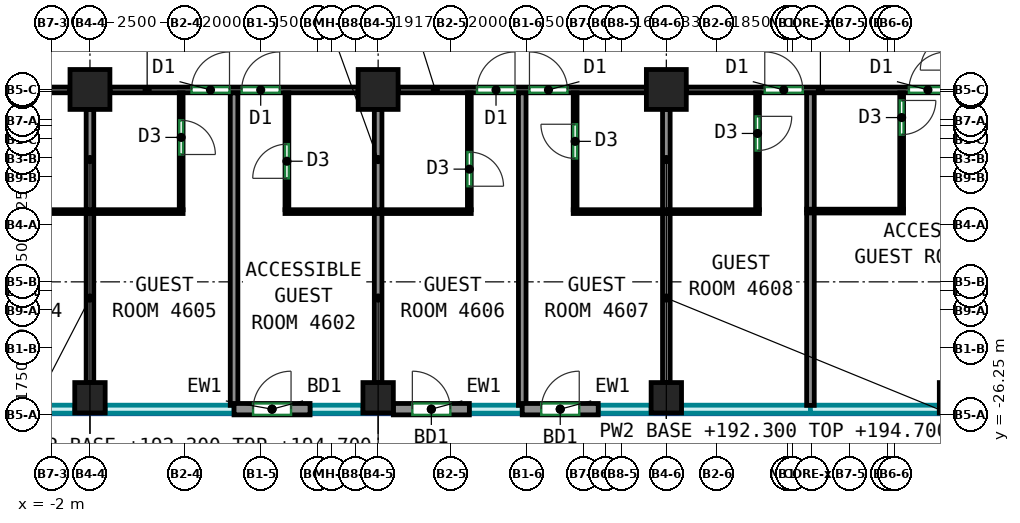
"""IFC4 building model, lengths in metres.
Left out: names, types, materials, properties, quantities, classifications, styles, units other than length and angle.
Written with IfcOpenShell. Run it as: python <this file> out.ifc"""

import sys

from ifc_helpers import new_model, si_unit, direction, frame, frame_2d, origin, origin_2d, place, context, subcontext, project, spatial, rectangle, extrude, source, transform, mapped, element, fill, save


model = new_model("IFC4")
c1 = context("Model", 3, precision=1e-05, world=origin(), true_north=direction((0.0, 1.0)))
c2 = subcontext(c1, "Body", "Model", "MODEL_VIEW")
j1 = project(units=[si_unit("LENGTHUNIT", "METRE"), si_unit("PLANEANGLEUNIT", "RADIAN")], contexts=[c1])
p1 = place(None, origin())
s1 = spatial("IfcSite", under=j1, at=p1, CompositionType="ELEMENT")
p2 = place(p1, origin())
s2 = spatial("IfcBuilding", under=s1, at=p2, CompositionType="ELEMENT")
p3 = place(p2, frame((0.0, 0.0, 192.3)))
s3 = spatial("IfcBuildingStorey", under=s2, at=p3, CompositionType="ELEMENT", Elevation=192.3)
m1 = source(origin(), c2, "Body", "SweptSolid", [
    extrude(rectangle(XDim=0.8, YDim=0.8, at=origin_2d()), origin(), (0.0, 0.0, 1.0), 3.0),
])
p4 = place(p3, frame((-1.0, -25.8, 0.0), z_axis=(0.0, 0.0, 1.0), x_axis=(1.0, 0.0, 0.0)))
e1 = element("IfcColumn", 1, at=p4, inside=s3, PredefinedType="COLUMN", context=c2, shape_type="MappedRepresentation", body=[
    mapped(m1, transform((0.0, 0.0, 0.0))),
])
m2 = source(origin(), c2, "Body", "SweptSolid", [
    extrude(rectangle(XDim=1.05, YDim=1.05, at=origin_2d()), origin(), (0.0, 0.0, 1.0), 3.0),
])
p5 = place(p3, frame((-1.0, -17.688, 0.0), z_axis=(0.0, 0.0, 1.0), x_axis=(1.0, 0.0, 0.0)))
e2 = element("IfcColumn", 2, at=p5, inside=s3, PredefinedType="COLUMN", context=c2, shape_type="MappedRepresentation", body=[
    mapped(m2, transform((0.0, 0.0, 0.0))),
])
p6 = place(p3, frame((6.583, -25.8, 0.0), z_axis=(0.0, 0.0, 1.0), x_axis=(1.0, 0.0, 0.0)))
e3 = element("IfcColumn", 3, at=p6, inside=s3, PredefinedType="COLUMN", context=c2, shape_type="MappedRepresentation", body=[
    mapped(m1, transform((0.0, 0.0, 0.0))),
])
p7 = place(p3, frame((6.583, -17.688, 0.0), z_axis=(0.0, 0.0, 1.0), x_axis=(1.0, 0.0, 0.0)))
e4 = element("IfcColumn", 4, at=p7, inside=s3, PredefinedType="COLUMN", context=c2, shape_type="MappedRepresentation", body=[
    mapped(m2, transform((0.0, 0.0, 0.0))),
])
p8 = place(p3, frame((14.167, -25.8, 0.0), z_axis=(0.0, 0.0, 1.0), x_axis=(1.0, 0.0, 0.0)))
e5 = element("IfcColumn", 5, at=p8, inside=s3, PredefinedType="COLUMN", context=c2, shape_type="MappedRepresentation", body=[
    mapped(m1, transform((0.0, 0.0, 0.0))),
])
p9 = place(p3, frame((14.167, -17.688, 0.0), z_axis=(0.0, 0.0, 1.0), x_axis=(1.0, 0.0, 0.0)))
e6 = element("IfcColumn", 6, at=p9, inside=s3, PredefinedType="COLUMN", context=c2, shape_type="MappedRepresentation", body=[
    mapped(m2, transform((0.0, 0.0, 0.0))),
])
p10 = place(p3, frame((21.75, -25.8, 0.0), z_axis=(0.0, 0.0, 1.0), x_axis=(1.0, 0.0, 0.0)))
e7 = element("IfcColumn", 7, at=p10, inside=s3, PredefinedType="COLUMN", context=c2, shape_type="MappedRepresentation", body=[
    mapped(m1, transform((0.0, 0.0, 0.0))),
])
m3 = source(origin(), c2, "Body", "SweptSolid", [
    extrude(rectangle(XDim=2.0, YDim=0.3, at=frame_2d((1.0, 0.0))), origin(), (0.0, 0.0, 1.0), 3.0),
])
p11 = place(p3, frame((2.792, -26.1, 0.0), z_axis=(0.0, 0.0, 1.0), x_axis=(1.0, 0.0, 0.0)))
e8 = element("IfcWall", 8, at=p11, inside=s3, PredefinedType="SOLIDWALL", context=c2, shape_type="MappedRepresentation", body=[
    mapped(m3, transform((0.0, 0.0, 0.0))),
])
p12 = place(p11, frame((0.5, 0.0, 0.0)))
e9 = element("IfcOpeningElement", 9, at=p12, cuts=e8, PredefinedType="OPENING", context=c2, shape_type="SweptSolid", body=[
    extrude(rectangle(XDim=1.0, YDim=2.1, at=frame_2d((0.5, 1.05))), frame((0.0, 0.16, 0.0), z_axis=(0.0, -1.0, 0.0), x_axis=(1.0, 0.0, 0.0)), (0.0, 0.0, 1.0), 0.32),
])
p13 = place(p3, frame((6.983, -26.1, 0.0), z_axis=(0.0, 0.0, 1.0), x_axis=(1.0, 0.0, 0.0)))
e10 = element("IfcWall", 10, at=p13, inside=s3, PredefinedType="SOLIDWALL", context=c2, shape_type="MappedRepresentation", body=[
    mapped(m3, transform((0.0, 0.0, 0.0))),
])
p14 = place(p13, frame((0.5, 0.0, 0.0)))
e11 = element("IfcOpeningElement", 11, at=p14, cuts=e10, PredefinedType="OPENING", context=c2, shape_type="SweptSolid", body=[
    extrude(rectangle(XDim=1.0, YDim=2.1, at=frame_2d((0.5, 1.05))), frame((0.0, 0.16, 0.0), z_axis=(0.0, -1.0, 0.0), x_axis=(1.0, 0.0, 0.0)), (0.0, 0.0, 1.0), 0.32),
])
p15 = place(p3, frame((10.375, -26.1, 0.0), z_axis=(0.0, 0.0, 1.0), x_axis=(1.0, 0.0, 0.0)))
e12 = element("IfcWall", 12, at=p15, inside=s3, PredefinedType="SOLIDWALL", context=c2, shape_type="MappedRepresentation", body=[
    mapped(m3, transform((0.0, 0.0, 0.0))),
])
p16 = place(p15, frame((0.5, 0.0, 0.0)))
e13 = element("IfcOpeningElement", 13, at=p16, cuts=e12, PredefinedType="OPENING", context=c2, shape_type="SweptSolid", body=[
    extrude(rectangle(XDim=1.0, YDim=2.1, at=frame_2d((0.5, 1.05))), frame((0.0, 0.16, 0.0), z_axis=(0.0, -1.0, 0.0), x_axis=(1.0, 0.0, 0.0)), (0.0, 0.0, 1.0), 0.32),
])
p17 = place(p3, frame((-8.058, -17.7, 0.0), z_axis=(0.0, 0.0, 1.0), x_axis=(1.0, 0.0, 0.0)))
e14 = element("IfcWall", 14, at=p17, inside=s3, PredefinedType="PARTITIONING", context=c2, shape_type="SweptSolid", body=[
    extrude(rectangle(XDim=6.533, YDim=0.15, at=frame_2d((3.267, 0.0))), origin(), (0.0, 0.0, 1.0), 2.4),
])
p18 = place(p17, frame((3.518, 0.0, 0.0)))
e15 = element("IfcOpeningElement", 15, at=p18, cuts=e14, PredefinedType="OPENING", context=c2, shape_type="SweptSolid", body=[
    extrude(rectangle(XDim=1.0, YDim=2.1, at=frame_2d((0.5, 1.05))), frame((0.0, 0.085, 0.0), z_axis=(0.0, -1.0, 0.0), x_axis=(1.0, 0.0, 0.0)), (0.0, 0.0, 1.0), 0.17),
])
p19 = place(p3, frame((-0.475, -17.7, 0.0), z_axis=(0.0, 0.0, 1.0), x_axis=(1.0, 0.0, 0.0)))
e16 = element("IfcWall", 16, at=p19, inside=s3, PredefinedType="PARTITIONING", context=c2, shape_type="SweptSolid", body=[
    extrude(rectangle(XDim=6.533, YDim=0.15, at=frame_2d((3.267, 0.0))), origin(), (0.0, 0.0, 1.0), 2.4),
])
p20 = place(p19, frame((2.147, 0.0, 0.0)))
e17 = element("IfcOpeningElement", 17, at=p20, cuts=e16, PredefinedType="OPENING", context=c2, shape_type="SweptSolid", body=[
    extrude(rectangle(XDim=1.0, YDim=2.1, at=frame_2d((0.5, 1.05))), frame((0.0, 0.085, 0.0), z_axis=(0.0, -1.0, 0.0), x_axis=(1.0, 0.0, 0.0)), (0.0, 0.0, 1.0), 0.17),
])
p21 = place(p19, frame((3.468, 0.0, 0.0)))
e18 = element("IfcOpeningElement", 18, at=p21, cuts=e16, PredefinedType="OPENING", context=c2, shape_type="SweptSolid", body=[
    extrude(rectangle(XDim=1.0, YDim=2.1, at=frame_2d((0.5, 1.05))), frame((0.0, 0.085, 0.0), z_axis=(0.0, -1.0, 0.0), x_axis=(1.0, 0.0, 0.0)), (0.0, 0.0, 1.0), 0.17),
])
p22 = place(p3, frame((7.108, -17.7, 0.0), z_axis=(0.0, 0.0, 1.0), x_axis=(1.0, 0.0, 0.0)))
e19 = element("IfcWall", 19, at=p22, inside=s3, PredefinedType="PARTITIONING", context=c2, shape_type="SweptSolid", body=[
    extrude(rectangle(XDim=6.534, YDim=0.15, at=frame_2d((3.267, 0.0))), origin(), (0.0, 0.0, 1.0), 2.4),
])
p23 = place(p22, frame((2.077, 0.0, 0.0)))
e20 = element("IfcOpeningElement", 20, at=p23, cuts=e19, PredefinedType="OPENING", context=c2, shape_type="SweptSolid", body=[
    extrude(rectangle(XDim=1.0, YDim=2.1, at=frame_2d((0.5, 1.05))), frame((0.0, 0.085, 0.0), z_axis=(0.0, -1.0, 0.0), x_axis=(1.0, 0.0, 0.0)), (0.0, 0.0, 1.0), 0.17),
])
p24 = place(p22, frame((3.457, 0.0, 0.0)))
e21 = element("IfcOpeningElement", 21, at=p24, cuts=e19, PredefinedType="OPENING", context=c2, shape_type="SweptSolid", body=[
    extrude(rectangle(XDim=1.0, YDim=2.1, at=frame_2d((0.5, 1.05))), frame((0.0, 0.085, 0.0), z_axis=(0.0, -1.0, 0.0), x_axis=(1.0, 0.0, 0.0)), (0.0, 0.0, 1.0), 0.17),
])
p25 = place(p3, frame((14.692, -17.7, 0.0), z_axis=(0.0, 0.0, 1.0), x_axis=(1.0, 0.0, 0.0)))
e22 = element("IfcWall", 22, at=p25, inside=s3, PredefinedType="PARTITIONING", context=c2, shape_type="SweptSolid", body=[
    extrude(rectangle(XDim=7.058, YDim=0.15, at=frame_2d((3.529, 0.0))), origin(), (0.0, 0.0, 1.0), 2.4),
])
p26 = place(p25, frame((2.065, 0.0, 0.0)))
e23 = element("IfcOpeningElement", 23, at=p26, cuts=e22, PredefinedType="OPENING", context=c2, shape_type="SweptSolid", body=[
    extrude(rectangle(XDim=1.0, YDim=2.1, at=frame_2d((0.5, 1.05))), frame((0.0, 0.085, 0.0), z_axis=(0.0, -1.0, 0.0), x_axis=(1.0, 0.0, 0.0)), (0.0, 0.0, 1.0), 0.17),
])
p27 = place(p25, frame((5.858, 0.0, 0.0)))
e24 = element("IfcOpeningElement", 24, at=p27, cuts=e22, PredefinedType="OPENING", context=c2, shape_type="SweptSolid", body=[
    extrude(rectangle(XDim=1.0, YDim=2.1, at=frame_2d((0.5, 1.05))), frame((0.0, 0.085, 0.0), z_axis=(0.0, -1.0, 0.0), x_axis=(1.0, 0.0, 0.0)), (0.0, 0.0, 1.0), 0.17),
])
p28 = place(p3, frame((-3.45, -20.902, 0.0), z_axis=(0.0, 0.0, 1.0), x_axis=(1.0, 0.0, 0.0)))
e25 = element("IfcWall", 25, at=p28, inside=s3, PredefinedType="PARTITIONING", context=c2, shape_type="SweptSolid", body=[
    extrude(rectangle(XDim=4.9, YDim=0.1, at=frame_2d((2.45, 0.0))), origin(), (0.0, 0.0, 1.0), 3.0),
])
p29 = place(p3, frame((-1.0, -25.4, 0.0), z_axis=(0.0, 0.0, 1.0), x_axis=(0.0, 1.0, 0.0)))
e26 = element("IfcWall", 26, at=p29, inside=s3, PredefinedType="PARTITIONING", context=c2, shape_type="SweptSolid", body=[
    extrude(rectangle(XDim=4.448, YDim=0.2, at=frame_2d((2.224, 0.0))), origin(), (0.0, 0.0, 1.0), 2.4),
])
p30 = place(p3, frame((-1.0, -20.852, 0.0), z_axis=(0.0, 0.0, 1.0), x_axis=(0.0, 1.0, 0.0)))
e27 = element("IfcWall", 27, at=p30, inside=s3, PredefinedType="PARTITIONING", context=c2, shape_type="SweptSolid", body=[
    extrude(rectangle(XDim=2.64, YDim=0.2, at=frame_2d((1.32, 0.0))), origin(), (0.0, 0.0, 1.0), 2.4),
])
p31 = place(p3, frame((1.4, -17.777, 0.0), z_axis=(0.0, 0.0, 1.0), x_axis=(0.0, -1.0, 0.0)))
e28 = element("IfcWall", 28, at=p31, inside=s3, PredefinedType="PARTITIONING", context=c2, shape_type="SweptSolid", body=[
    extrude(rectangle(XDim=3.075, YDim=0.1, at=frame_2d((1.538, 0.0))), origin(), (0.0, 0.0, 1.0), 3.0),
])
p32 = place(p31, frame((0.722, 0.0, 0.0)))
e29 = element("IfcOpeningElement", 29, at=p32, cuts=e28, PredefinedType="OPENING", context=c2, shape_type="SweptSolid", body=[
    extrude(rectangle(XDim=0.9, YDim=2.1, at=frame_2d((0.45, 1.05))), frame((0.0, 0.06, 0.0), z_axis=(0.0, -1.0, 0.0), x_axis=(1.0, 0.0, 0.0)), (0.0, 0.0, 1.0), 0.12),
])
p33 = place(p3, frame((2.792, -26.0, 0.0), z_axis=(0.0, 0.0, 1.0), x_axis=(0.0, 1.0, 0.0)))
e30 = element("IfcWall", 30, at=p33, inside=s3, PredefinedType="PARTITIONING", context=c2, shape_type="SweptSolid", body=[
    extrude(rectangle(XDim=8.223, YDim=0.2, at=frame_2d((4.111, 0.0))), origin(), (0.0, 0.0, 1.0), 3.0),
])
p34 = place(p3, frame((4.183, -20.852, 0.0), z_axis=(0.0, 0.0, 1.0), x_axis=(0.0, 1.0, 0.0)))
e31 = element("IfcWall", 31, at=p34, inside=s3, PredefinedType="PARTITIONING", context=c2, shape_type="SweptSolid", body=[
    extrude(rectangle(XDim=3.075, YDim=0.1, at=frame_2d((1.538, 0.0))), origin(), (0.0, 0.0, 1.0), 3.0),
])
p35 = place(p34, frame((0.826, 0.0, 0.0)))
e32 = element("IfcOpeningElement", 32, at=p35, cuts=e31, PredefinedType="OPENING", context=c2, shape_type="SweptSolid", body=[
    extrude(rectangle(XDim=0.9, YDim=2.1, at=frame_2d((0.45, 1.05))), frame((0.0, 0.06, 0.0), z_axis=(0.0, -1.0, 0.0), x_axis=(1.0, 0.0, 0.0)), (0.0, 0.0, 1.0), 0.12),
])
p36 = place(p3, frame((4.133, -20.902, 0.0), z_axis=(0.0, 0.0, 1.0), x_axis=(1.0, 0.0, 0.0)))
e33 = element("IfcWall", 33, at=p36, inside=s3, PredefinedType="PARTITIONING", context=c2, shape_type="SweptSolid", body=[
    extrude(rectangle(XDim=4.9, YDim=0.1, at=frame_2d((2.45, 0.0))), origin(), (0.0, 0.0, 1.0), 3.0),
])
p37 = place(p3, frame((6.583, -25.4, 0.0), z_axis=(0.0, 0.0, 1.0), x_axis=(0.0, 1.0, 0.0)))
e34 = element("IfcWall", 34, at=p37, inside=s3, PredefinedType="PARTITIONING", context=c2, shape_type="SweptSolid", body=[
    extrude(rectangle(XDim=4.448, YDim=0.2, at=frame_2d((2.224, 0.0))), origin(), (0.0, 0.0, 1.0), 2.4),
])
p38 = place(p3, frame((6.583, -20.852, 0.0), z_axis=(0.0, 0.0, 1.0), x_axis=(0.0, 1.0, 0.0)))
e35 = element("IfcWall", 35, at=p38, inside=s3, PredefinedType="PARTITIONING", context=c2, shape_type="SweptSolid", body=[
    extrude(rectangle(XDim=2.64, YDim=0.2, at=frame_2d((1.32, 0.0))), origin(), (0.0, 0.0, 1.0), 2.4),
])
p39 = place(p3, frame((8.983, -17.777, 0.0), z_axis=(0.0, 0.0, 1.0), x_axis=(0.0, -1.0, 0.0)))
e36 = element("IfcWall", 36, at=p39, inside=s3, PredefinedType="PARTITIONING", context=c2, shape_type="SweptSolid", body=[
    extrude(rectangle(XDim=3.075, YDim=0.1, at=frame_2d((1.538, 0.0))), origin(), (0.0, 0.0, 1.0), 3.0),
])
p40 = place(p39, frame((1.557, 0.0, 0.0)))
e37 = element("IfcOpeningElement", 37, at=p40, cuts=e36, PredefinedType="OPENING", context=c2, shape_type="SweptSolid", body=[
    extrude(rectangle(XDim=0.9, YDim=2.1, at=frame_2d((0.45, 1.05))), frame((0.0, 0.06, 0.0), z_axis=(0.0, -1.0, 0.0), x_axis=(1.0, 0.0, 0.0)), (0.0, 0.0, 1.0), 0.12),
])
p41 = place(p3, frame((10.375, -26.0, 0.0), z_axis=(0.0, 0.0, 1.0), x_axis=(0.0, 1.0, 0.0)))
e38 = element("IfcWall", 38, at=p41, inside=s3, PredefinedType="PARTITIONING", context=c2, shape_type="SweptSolid", body=[
    extrude(rectangle(XDim=8.223, YDim=0.2, at=frame_2d((4.111, 0.0))), origin(), (0.0, 0.0, 1.0), 3.0),
])
p42 = place(p3, frame((11.767, -20.852, 0.0), z_axis=(0.0, 0.0, 1.0), x_axis=(0.0, 1.0, 0.0)))
e39 = element("IfcWall", 39, at=p42, inside=s3, PredefinedType="PARTITIONING", context=c2, shape_type="SweptSolid", body=[
    extrude(rectangle(XDim=3.075, YDim=0.1, at=frame_2d((1.538, 0.0))), origin(), (0.0, 0.0, 1.0), 3.0),
])
p43 = place(p42, frame((1.349, 0.0, 0.0)))
e40 = element("IfcOpeningElement", 40, at=p43, cuts=e39, PredefinedType="OPENING", context=c2, shape_type="SweptSolid", body=[
    extrude(rectangle(XDim=0.9, YDim=2.1, at=frame_2d((0.45, 1.05))), frame((0.0, 0.06, 0.0), z_axis=(0.0, -1.0, 0.0), x_axis=(1.0, 0.0, 0.0)), (0.0, 0.0, 1.0), 0.12),
])
p44 = place(p3, frame((11.717, -20.902, 0.0), z_axis=(0.0, 0.0, 1.0), x_axis=(1.0, 0.0, 0.0)))
e41 = element("IfcWall", 41, at=p44, inside=s3, PredefinedType="PARTITIONING", context=c2, shape_type="SweptSolid", body=[
    extrude(rectangle(XDim=4.9, YDim=0.1, at=frame_2d((2.45, 0.0))), origin(), (0.0, 0.0, 1.0), 3.0),
])
p45 = place(p3, frame((14.167, -25.4, 0.0), z_axis=(0.0, 0.0, 1.0), x_axis=(0.0, 1.0, 0.0)))
e42 = element("IfcWall", 42, at=p45, inside=s3, PredefinedType="PARTITIONING", context=c2, shape_type="SweptSolid", body=[
    extrude(rectangle(XDim=4.448, YDim=0.2, at=frame_2d((2.224, 0.0))), origin(), (0.0, 0.0, 1.0), 2.4),
])
p46 = place(p3, frame((14.167, -20.852, 0.0), z_axis=(0.0, 0.0, 1.0), x_axis=(0.0, 1.0, 0.0)))
e43 = element("IfcWall", 43, at=p46, inside=s3, PredefinedType="PARTITIONING", context=c2, shape_type="SweptSolid", body=[
    extrude(rectangle(XDim=2.64, YDim=0.2, at=frame_2d((1.32, 0.0))), origin(), (0.0, 0.0, 1.0), 2.4),
])
p47 = place(p3, frame((16.567, -17.777, 0.0), z_axis=(0.0, 0.0, 1.0), x_axis=(0.0, -1.0, 0.0)))
e44 = element("IfcWall", 44, at=p47, inside=s3, PredefinedType="PARTITIONING", context=c2, shape_type="SweptSolid", body=[
    extrude(rectangle(XDim=3.075, YDim=0.1, at=frame_2d((1.538, 0.0))), origin(), (0.0, 0.0, 1.0), 3.0),
])
p48 = place(p47, frame((0.618, 0.0, 0.0)))
e45 = element("IfcOpeningElement", 45, at=p48, cuts=e44, PredefinedType="OPENING", context=c2, shape_type="SweptSolid", body=[
    extrude(rectangle(XDim=0.9, YDim=2.1, at=frame_2d((0.45, 1.05))), frame((0.0, 0.06, 0.0), z_axis=(0.0, -1.0, 0.0), x_axis=(1.0, 0.0, 0.0)), (0.0, 0.0, 1.0), 0.12),
])
p49 = place(p3, frame((17.959, -26.0, 0.0), z_axis=(0.0, 0.0, 1.0), x_axis=(0.0, 1.0, 0.0)))
e46 = element("IfcWall", 46, at=p49, inside=s3, PredefinedType="PARTITIONING", context=c2, shape_type="SweptSolid", body=[
    extrude(rectangle(XDim=5.072, YDim=0.2, at=frame_2d((2.536, 0.0))), origin(), (0.0, 0.0, 1.0), 3.0),
])
p50 = place(p3, frame((17.959, -20.848, 0.0), z_axis=(0.0, 0.0, 1.0), x_axis=(0.0, 1.0, 0.0)))
e47 = element("IfcWall", 47, at=p50, inside=s3, PredefinedType="PARTITIONING", context=c2, shape_type="SweptSolid", body=[
    extrude(rectangle(XDim=3.071, YDim=0.2, at=frame_2d((1.535, 0.0))), origin(), (0.0, 0.0, 1.0), 3.0),
])
p51 = place(p3, frame((17.859, -20.888, 0.0), z_axis=(0.0, 0.0, 1.0), x_axis=(1.0, 0.0, 0.0)))
e48 = element("IfcWall", 48, at=p51, inside=s3, PredefinedType="PARTITIONING", context=c2, shape_type="SweptSolid", body=[
    extrude(rectangle(XDim=2.55, YDim=0.1, at=frame_2d((1.275, 0.0))), origin(), (0.0, 0.0, 1.0), 3.0),
])
p52 = place(p3, frame((20.359, -17.777, 0.0), z_axis=(0.0, 0.0, 1.0), x_axis=(0.0, -1.0, 0.0)))
e49 = element("IfcWall", 49, at=p52, inside=s3, PredefinedType="PARTITIONING", context=c2, shape_type="SweptSolid", body=[
    extrude(rectangle(XDim=3.061, YDim=0.1, at=frame_2d((1.53, 0.0))), origin(), (0.0, 0.0, 1.0), 3.0),
])
p53 = place(p52, frame((0.2, 0.0, 0.0)))
e50 = element("IfcOpeningElement", 50, at=p53, cuts=e49, PredefinedType="OPENING", context=c2, shape_type="SweptSolid", body=[
    extrude(rectangle(XDim=0.9, YDim=2.1, at=frame_2d((0.45, 1.05))), frame((0.0, 0.06, 0.0), z_axis=(0.0, -1.0, 0.0), x_axis=(1.0, 0.0, 0.0)), (0.0, 0.0, 1.0), 0.12),
])
p54 = place(p12, origin())
e51 = element("IfcDoor", 51, at=p54, inside=s3, OperationType="SINGLE_SWING_RIGHT", PredefinedType="DOOR", context=c2, shape_type="SweptSolid", body=[
    extrude(rectangle(XDim=1.0, YDim=2.1, at=frame_2d((0.5, 1.05))), frame((0.0, 0.025, 0.0), z_axis=(0.0, -1.0, 0.0), x_axis=(1.0, 0.0, 0.0)), (0.0, 0.0, 1.0), 0.05),
])
fill(e9, e51)
p55 = place(p14, origin())
e52 = element("IfcDoor", 52, at=p55, inside=s3, OperationType="SINGLE_SWING_LEFT", PredefinedType="DOOR", context=c2, shape_type="SweptSolid", body=[
    extrude(rectangle(XDim=1.0, YDim=2.1, at=frame_2d((0.5, 1.05))), frame((0.0, 0.025, 0.0), z_axis=(0.0, -1.0, 0.0), x_axis=(1.0, 0.0, 0.0)), (0.0, 0.0, 1.0), 0.05),
])
fill(e11, e52)
p56 = place(p16, origin())
e53 = element("IfcDoor", 53, at=p56, inside=s3, OperationType="SINGLE_SWING_RIGHT", PredefinedType="DOOR", context=c2, shape_type="SweptSolid", body=[
    extrude(rectangle(XDim=1.0, YDim=2.1, at=frame_2d((0.5, 1.05))), frame((0.0, 0.025, 0.0), z_axis=(0.0, -1.0, 0.0), x_axis=(1.0, 0.0, 0.0)), (0.0, 0.0, 1.0), 0.05),
])
fill(e13, e53)
p57 = place(p40, origin())
e54 = element("IfcDoor", 54, at=p57, inside=s3, OperationType="SINGLE_SWING_RIGHT", PredefinedType="DOOR", context=c2, shape_type="SweptSolid", body=[
    extrude(rectangle(XDim=0.9, YDim=2.1, at=frame_2d((0.45, 1.05))), frame((0.0, 0.025, 0.0), z_axis=(0.0, -1.0, 0.0), x_axis=(1.0, 0.0, 0.0)), (0.0, 0.0, 1.0), 0.05),
])
fill(e37, e54)
p58 = place(p35, origin())
e55 = element("IfcDoor", 55, at=p58, inside=s3, OperationType="SINGLE_SWING_LEFT", PredefinedType="DOOR", context=c2, shape_type="SweptSolid", body=[
    extrude(rectangle(XDim=0.9, YDim=2.1, at=frame_2d((0.45, 1.05))), frame((0.0, 0.025, 0.0), z_axis=(0.0, -1.0, 0.0), x_axis=(1.0, 0.0, 0.0)), (0.0, 0.0, 1.0), 0.05),
])
fill(e32, e55)
p59 = place(p43, origin())
e56 = element("IfcDoor", 56, at=p59, inside=s3, OperationType="SINGLE_SWING_RIGHT", PredefinedType="DOOR", context=c2, shape_type="SweptSolid", body=[
    extrude(rectangle(XDim=0.9, YDim=2.1, at=frame_2d((0.45, 1.05))), frame((0.0, 0.025, 0.0), z_axis=(0.0, -1.0, 0.0), x_axis=(1.0, 0.0, 0.0)), (0.0, 0.0, 1.0), 0.05),
])
fill(e40, e56)
p60 = place(p32, origin())
e57 = element("IfcDoor", 57, at=p60, inside=s3, OperationType="SINGLE_SWING_RIGHT", PredefinedType="DOOR", context=c2, shape_type="SweptSolid", body=[
    extrude(rectangle(XDim=0.9, YDim=2.1, at=frame_2d((0.45, 1.05))), frame((0.0, 0.025, 0.0), z_axis=(0.0, -1.0, 0.0), x_axis=(1.0, 0.0, 0.0)), (0.0, 0.0, 1.0), 0.05),
])
fill(e29, e57)
p61 = place(p48, origin())
e58 = element("IfcDoor", 58, at=p61, inside=s3, OperationType="SINGLE_SWING_LEFT", PredefinedType="DOOR", context=c2, shape_type="SweptSolid", body=[
    extrude(rectangle(XDim=0.9, YDim=2.1, at=frame_2d((0.45, 1.05))), frame((0.0, 0.025, 0.0), z_axis=(0.0, -1.0, 0.0), x_axis=(1.0, 0.0, 0.0)), (0.0, 0.0, 1.0), 0.05),
])
fill(e45, e58)
p62 = place(p53, origin())
e59 = element("IfcDoor", 59, at=p62, inside=s3, OperationType="SINGLE_SWING_LEFT", PredefinedType="DOOR", context=c2, shape_type="SweptSolid", body=[
    extrude(rectangle(XDim=0.9, YDim=2.1, at=frame_2d((0.45, 1.05))), frame((0.0, 0.025, 0.0), z_axis=(0.0, -1.0, 0.0), x_axis=(1.0, 0.0, 0.0)), (0.0, 0.0, 1.0), 0.05),
])
fill(e50, e59)
p63 = place(p20, origin())
e60 = element("IfcDoor", 60, at=p63, inside=s3, OperationType="SINGLE_SWING_RIGHT", PredefinedType="DOOR", context=c2, shape_type="SweptSolid", body=[
    extrude(rectangle(XDim=1.0, YDim=2.1, at=frame_2d((0.5, 1.05))), frame((0.0, 0.025, 0.0), z_axis=(0.0, -1.0, 0.0), x_axis=(1.0, 0.0, 0.0)), (0.0, 0.0, 1.0), 0.05),
])
fill(e17, e60)
p64 = place(p21, origin())
e61 = element("IfcDoor", 61, at=p64, inside=s3, OperationType="SINGLE_SWING_RIGHT", PredefinedType="DOOR", context=c2, shape_type="SweptSolid", body=[
    extrude(rectangle(XDim=1.0, YDim=2.1, at=frame_2d((0.5, 1.05))), frame((0.0, 0.025, 0.0), z_axis=(0.0, -1.0, 0.0), x_axis=(1.0, 0.0, 0.0)), (0.0, 0.0, 1.0), 0.05),
])
fill(e18, e61)
p65 = place(p23, origin())
e62 = element("IfcDoor", 62, at=p65, inside=s3, OperationType="SINGLE_SWING_RIGHT", PredefinedType="DOOR", context=c2, shape_type="SweptSolid", body=[
    extrude(rectangle(XDim=1.0, YDim=2.1, at=frame_2d((0.5, 1.05))), frame((0.0, 0.025, 0.0), z_axis=(0.0, -1.0, 0.0), x_axis=(1.0, 0.0, 0.0)), (0.0, 0.0, 1.0), 0.05),
])
fill(e20, e62)
p66 = place(p24, origin())
e63 = element("IfcDoor", 63, at=p66, inside=s3, OperationType="SINGLE_SWING_LEFT", PredefinedType="DOOR", context=c2, shape_type="SweptSolid", body=[
    extrude(rectangle(XDim=1.0, YDim=2.1, at=frame_2d((0.5, 1.05))), frame((0.0, 0.025, 0.0), z_axis=(0.0, -1.0, 0.0), x_axis=(1.0, 0.0, 0.0)), (0.0, 0.0, 1.0), 0.05),
])
fill(e21, e63)
p67 = place(p26, origin())
e64 = element("IfcDoor", 64, at=p67, inside=s3, OperationType="SINGLE_SWING_LEFT", PredefinedType="DOOR", context=c2, shape_type="SweptSolid", body=[
    extrude(rectangle(XDim=1.0, YDim=2.1, at=frame_2d((0.5, 1.05))), frame((0.0, 0.025, 0.0), z_axis=(0.0, -1.0, 0.0), x_axis=(1.0, 0.0, 0.0)), (0.0, 0.0, 1.0), 0.05),
])
fill(e23, e64)
p68 = place(p27, origin())
e65 = element("IfcDoor", 65, at=p68, inside=s3, OperationType="SINGLE_SWING_RIGHT", PredefinedType="DOOR", context=c2, shape_type="SweptSolid", body=[
    extrude(rectangle(XDim=1.0, YDim=2.1, at=frame_2d((0.5, 1.05))), frame((0.0, 0.025, 0.0), z_axis=(0.0, -1.0, 0.0), x_axis=(1.0, 0.0, 0.0)), (0.0, 0.0, 1.0), 0.05),
])
fill(e24, e65)
save(model, sys.argv[1])
